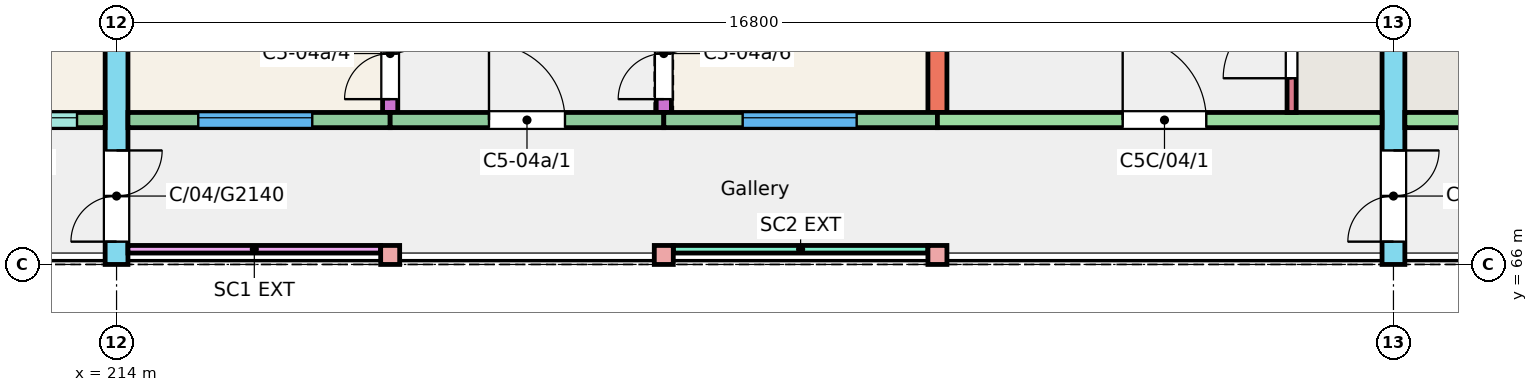
"""IFC4 building model, lengths in metres.
Left out: names, types, materials, properties, quantities, classifications, styles, units other than length and angle.
Written with IfcOpenShell. Run it as: python <this file> out.ifc"""

import sys

from ifc_helpers import new_model, si_unit, direction, frame, frame_2d, origin, origin_2d, place, context, subcontext, project, spatial, rectangle, extrude, element, fill, save


model = new_model("IFC4")
c1 = context("Model", 3, precision=1e-05, world=origin(), true_north=direction((0.0, 1.0)))
c2 = subcontext(c1, "Body", "Model", "MODEL_VIEW")
j1 = project(units=[si_unit("LENGTHUNIT", "METRE"), si_unit("PLANEANGLEUNIT", "RADIAN")], contexts=[c1])
p1 = place(None, origin())
s1 = spatial("IfcSite", under=j1, at=p1, CompositionType="ELEMENT")
p2 = place(p1, origin())
s2 = spatial("IfcBuilding", under=s1, at=p2, CompositionType="ELEMENT")
p3 = place(p2, frame((0.0, 0.0, 12.0)))
s3 = spatial("IfcBuildingStorey", under=s2, at=p3, CompositionType="ELEMENT", Elevation=12.0)
p4 = place(p3, frame((214.0, 66.0, 0.0), z_axis=(0.0, 0.0, 1.0), x_axis=(0.0, 1.0, 0.0)))
e1 = element("IfcWall", 1, at=p4, inside=s3, PredefinedType="SHEAR", context=c2, shape_type="SweptSolid", body=[
    extrude(rectangle(XDim=11.0, YDim=0.3, at=frame_2d((5.5, 0.0))), origin(), (0.0, 0.0, 1.0), 3.0),
])
p5 = place(p4, frame((0.3, 0.0, 0.0)))
e2 = element("IfcOpeningElement", 2, at=p5, cuts=e1, PredefinedType="OPENING", context=c2, shape_type="SweptSolid", body=[
    extrude(rectangle(XDim=1.2, YDim=2.1, at=frame_2d((0.6, 1.05))), frame((0.0, 0.16, 0.0), z_axis=(0.0, -1.0, 0.0), x_axis=(1.0, 0.0, 0.0)), (0.0, 0.0, 1.0), 0.32),
])
p6 = place(p3, frame((217.6, 68.0, 0.0), z_axis=(0.0, 0.0, 1.0), x_axis=(0.0, 1.0, 0.0)))
e3 = element("IfcWall", 3, at=p6, inside=s3, PredefinedType="SHEAR", context=c2, shape_type="SweptSolid", body=[
    extrude(rectangle(XDim=9.0, YDim=0.2, at=frame_2d((4.5, 0.0))), origin(), (0.0, 0.0, 1.0), 3.0),
])
p7 = place(p6, frame((0.175, 0.0, 0.0)))
e4 = element("IfcOpeningElement", 4, at=p7, cuts=e3, PredefinedType="OPENING", context=c2, shape_type="SweptSolid", body=[
    extrude(rectangle(XDim=1.2, YDim=2.1, at=frame_2d((0.6, 1.05))), frame((0.0, 0.11, 0.0), z_axis=(0.0, -1.0, 0.0), x_axis=(1.0, 0.0, 0.0)), (0.0, 0.0, 1.0), 0.22),
])
p8 = place(p6, frame((6.4, 0.0, 0.0)))
e5 = element("IfcOpeningElement", 5, at=p8, cuts=e3, PredefinedType="OPENING", context=c2, shape_type="SweptSolid", body=[
    extrude(rectangle(XDim=1.2, YDim=2.1, at=frame_2d((0.6, 1.05))), frame((0.0, 0.11, 0.0), z_axis=(0.0, -1.0, 0.0), x_axis=(1.0, 0.0, 0.0)), (0.0, 0.0, 1.0), 0.22),
])
p9 = place(p3, frame((221.2, 68.0, 0.0), z_axis=(0.0, 0.0, 1.0), x_axis=(0.0, 1.0, 0.0)))
e6 = element("IfcWall", 6, at=p9, inside=s3, PredefinedType="SHEAR", context=c2, shape_type="SweptSolid", body=[
    extrude(rectangle(XDim=9.0, YDim=0.2, at=frame_2d((4.5, 0.0))), origin(), (0.0, 0.0, 1.0), 3.0),
])
p10 = place(p9, frame((0.175, 0.0, 0.0)))
e7 = element("IfcOpeningElement", 7, at=p10, cuts=e6, PredefinedType="OPENING", context=c2, shape_type="SweptSolid", body=[
    extrude(rectangle(XDim=1.2, YDim=2.1, at=frame_2d((0.6, 1.05))), frame((0.0, 0.11, 0.0), z_axis=(0.0, -1.0, 0.0), x_axis=(1.0, 0.0, 0.0)), (0.0, 0.0, 1.0), 0.22),
])
p11 = place(p9, frame((6.4, 0.0, 0.0)))
e8 = element("IfcOpeningElement", 8, at=p11, cuts=e6, PredefinedType="OPENING", context=c2, shape_type="SweptSolid", body=[
    extrude(rectangle(XDim=1.2, YDim=2.1, at=frame_2d((0.6, 1.05))), frame((0.0, 0.11, 0.0), z_axis=(0.0, -1.0, 0.0), x_axis=(1.0, 0.0, 0.0)), (0.0, 0.0, 1.0), 0.22),
])
p12 = place(p3, frame((224.8, 68.0, 0.0), z_axis=(0.0, 0.0, 1.0), x_axis=(0.0, 1.0, 0.0)))
e9 = element("IfcWall", 9, at=p12, inside=s3, PredefinedType="SHEAR", context=c2, shape_type="SweptSolid", body=[
    extrude(rectangle(XDim=9.0, YDim=0.25, at=frame_2d((4.5, 0.0))), origin(), (0.0, 0.0, 1.0), 3.0),
])
p13 = place(p3, frame((230.8, 66.0, 0.0), z_axis=(0.0, 0.0, 1.0), x_axis=(0.0, 1.0, 0.0)))
e10 = element("IfcWall", 10, at=p13, inside=s3, PredefinedType="SHEAR", context=c2, shape_type="SweptSolid", body=[
    extrude(rectangle(XDim=11.0, YDim=0.3, at=frame_2d((5.5, 0.0))), origin(), (0.0, 0.0, 1.0), 3.0),
])
p14 = place(p13, frame((0.3, 0.0, 0.0)))
e11 = element("IfcOpeningElement", 11, at=p14, cuts=e10, PredefinedType="OPENING", context=c2, shape_type="SweptSolid", body=[
    extrude(rectangle(XDim=1.2, YDim=2.1, at=frame_2d((0.6, 1.05))), frame((0.0, 0.16, 0.0), z_axis=(0.0, -1.0, 0.0), x_axis=(1.0, 0.0, 0.0)), (0.0, 0.0, 1.0), 0.32),
])
p15 = place(p3, frame((210.4, 67.9, 0.0), z_axis=(0.0, 0.0, 1.0), x_axis=(1.0, 0.0, 0.0)))
e12 = element("IfcWall", 12, at=p15, inside=s3, PredefinedType="SOLIDWALL", context=c2, shape_type="SweptSolid", body=[
    extrude(rectangle(XDim=3.45, YDim=0.2, at=frame_2d((1.725, 0.0))), origin(), (0.0, 0.0, 1.0), 3.0),
])
p16 = place(p15, frame((1.88, 0.0, 1.1)))
e13 = element("IfcOpeningElement", 13, at=p16, cuts=e12, PredefinedType="OPENING", context=c2, shape_type="SweptSolid", body=[
    extrude(rectangle(XDim=1.2, YDim=1.3, at=frame_2d((0.6, 0.65))), frame((0.0, 0.11, 0.0), z_axis=(0.0, -1.0, 0.0), x_axis=(1.0, 0.0, 0.0)), (0.0, 0.0, 1.0), 0.22),
])
p17 = place(p15, frame((0.25, 0.0, 0.0)))
e14 = element("IfcOpeningElement", 14, at=p17, cuts=e12, PredefinedType="OPENING", context=c2, shape_type="SweptSolid", body=[
    extrude(rectangle(XDim=1.0, YDim=2.1, at=frame_2d((0.5, 1.05))), frame((0.0, 0.11, 0.0), z_axis=(0.0, -1.0, 0.0), x_axis=(1.0, 0.0, 0.0)), (0.0, 0.0, 1.0), 0.22),
])
p18 = place(p3, frame((214.15, 67.9, 0.0), z_axis=(0.0, 0.0, 1.0), x_axis=(1.0, 0.0, 0.0)))
e15 = element("IfcWall", 15, at=p18, inside=s3, PredefinedType="SOLIDWALL", context=c2, shape_type="SweptSolid", body=[
    extrude(rectangle(XDim=3.45, YDim=0.2, at=frame_2d((1.725, 0.0))), origin(), (0.0, 0.0, 1.0), 3.0),
])
p19 = place(p18, frame((0.925, 0.0, 0.9)))
e16 = element("IfcOpeningElement", 16, at=p19, cuts=e15, PredefinedType="OPENING", context=c2, shape_type="SweptSolid", body=[
    extrude(rectangle(XDim=1.5, YDim=1.5, at=frame_2d((0.75, 0.75))), frame((0.0, 0.11, 0.0), z_axis=(0.0, -1.0, 0.0), x_axis=(1.0, 0.0, 0.0)), (0.0, 0.0, 1.0), 0.22),
])
p20 = place(p3, frame((217.6, 67.9, 0.0), z_axis=(0.0, 0.0, 1.0), x_axis=(1.0, 0.0, 0.0)))
e17 = element("IfcWall", 17, at=p20, inside=s3, PredefinedType="SOLIDWALL", context=c2, shape_type="SweptSolid", body=[
    extrude(rectangle(XDim=3.6, YDim=0.2, at=frame_2d((1.8, 0.0))), origin(), (0.0, 0.0, 1.0), 3.0),
])
p21 = place(p20, frame((1.3, 0.0, 0.0)))
e18 = element("IfcOpeningElement", 18, at=p21, cuts=e17, PredefinedType="OPENING", context=c2, shape_type="SweptSolid", body=[
    extrude(rectangle(XDim=1.0, YDim=2.1, at=frame_2d((0.5, 1.05))), frame((0.0, 0.11, 0.0), z_axis=(0.0, -1.0, 0.0), x_axis=(1.0, 0.0, 0.0)), (0.0, 0.0, 1.0), 0.22),
])
p22 = place(p3, frame((221.2, 67.9, 0.0), z_axis=(0.0, 0.0, 1.0), x_axis=(1.0, 0.0, 0.0)))
e19 = element("IfcWall", 19, at=p22, inside=s3, PredefinedType="SOLIDWALL", context=c2, shape_type="SweptSolid", body=[
    extrude(rectangle(XDim=3.6, YDim=0.2, at=frame_2d((1.8, 0.0))), origin(), (0.0, 0.0, 1.0), 3.0),
])
p23 = place(p22, frame((1.038, 0.0, 0.9)))
e20 = element("IfcOpeningElement", 20, at=p23, cuts=e19, PredefinedType="OPENING", context=c2, shape_type="SweptSolid", body=[
    extrude(rectangle(XDim=1.5, YDim=1.5, at=frame_2d((0.75, 0.75))), frame((0.0, 0.11, 0.0), z_axis=(0.0, -1.0, 0.0), x_axis=(1.0, 0.0, 0.0)), (0.0, 0.0, 1.0), 0.22),
])
p24 = place(p3, frame((224.8, 67.9, 0.0), z_axis=(0.0, 0.0, 1.0), x_axis=(1.0, 0.0, 0.0)))
e21 = element("IfcWall", 21, at=p24, inside=s3, PredefinedType="SHEAR", context=c2, shape_type="SweptSolid", body=[
    extrude(rectangle(XDim=5.85, YDim=0.2, at=frame_2d((2.925, 0.0))), origin(), (0.0, 0.0, 1.0), 3.0),
])
p25 = place(p24, frame((2.438, 0.0, 0.0)))
e22 = element("IfcOpeningElement", 22, at=p25, cuts=e21, PredefinedType="OPENING", context=c2, shape_type="SweptSolid", body=[
    extrude(rectangle(XDim=1.1, YDim=2.1, at=frame_2d((0.55, 1.05))), frame((0.0, 0.11, 0.0), z_axis=(0.0, -1.0, 0.0), x_axis=(1.0, 0.0, 0.0)), (0.0, 0.0, 1.0), 0.22),
])
p26 = place(p3, frame((229.46, 68.0, 0.0), z_axis=(0.0, 0.0, 1.0), x_axis=(0.0, 1.0, 0.0)))
e23 = element("IfcWall", 23, at=p26, inside=s3, PredefinedType="SHEAR", context=c2, shape_type="SweptSolid", body=[
    extrude(rectangle(XDim=1.72, YDim=0.12, at=frame_2d((0.86, 0.0))), origin(), (0.0, 0.0, 1.0), 3.0),
])
p27 = place(p26, frame((0.45, 0.0, 0.0)))
e24 = element("IfcOpeningElement", 24, at=p27, cuts=e23, PredefinedType="OPENING", context=c2, shape_type="SweptSolid", body=[
    extrude(rectangle(XDim=0.9, YDim=2.1, at=frame_2d((0.45, 1.05))), frame((0.0, 0.07, 0.0), z_axis=(0.0, -1.0, 0.0), x_axis=(1.0, 0.0, 0.0)), (0.0, 0.0, 1.0), 0.14),
])
p28 = place(p3, frame((230.95, 67.9, 0.0), z_axis=(0.0, 0.0, 1.0), x_axis=(1.0, 0.0, 0.0)))
e25 = element("IfcWall", 25, at=p28, inside=s3, PredefinedType="SHEAR", context=c2, shape_type="SweptSolid", body=[
    extrude(rectangle(XDim=5.85, YDim=0.2, at=frame_2d((2.925, 0.0))), origin(), (0.0, 0.0, 1.0), 3.0),
])
p29 = place(p28, frame((2.312, 0.0, 0.0)))
e26 = element("IfcOpeningElement", 26, at=p29, cuts=e25, PredefinedType="OPENING", context=c2, shape_type="SweptSolid", body=[
    extrude(rectangle(XDim=1.1, YDim=2.1, at=frame_2d((0.55, 1.05))), frame((0.0, 0.11, 0.0), z_axis=(0.0, -1.0, 0.0), x_axis=(1.0, 0.0, 0.0)), (0.0, 0.0, 1.0), 0.22),
])
for number, where, z_axis, x_axis in (
    (27, (217.6, 66.125, 0.0), (0.0, 0.0, 1.0), (1.0, 0.0, 0.0)),
    (28, (221.2, 66.125, 0.0), (0.0, 0.0, 1.0), (1.0, 0.0, 0.0)),
    (29, (224.8, 66.125, 0.0), (0.0, 0.0, 1.0), (1.0, 0.0, 0.0)),
):
    element("IfcColumn", number, at=place(p3, frame(where, z_axis=z_axis, x_axis=x_axis)), inside=s3, PredefinedType="COLUMN", context=c2, shape_type="SweptSolid", body=[
        extrude(rectangle(XDim=0.25, YDim=0.25, at=origin_2d()), origin(), (0.0, 0.0, 1.0), 3.0),
    ])
p30 = place(p3, frame((214.15, 66.2, 0.0), z_axis=(0.0, 0.0, 1.0), x_axis=(1.0, 0.0, 0.0)))
e30 = element("IfcWall", 30, at=p30, inside=s3, PredefinedType="SOLIDWALL", context=c2, shape_type="SweptSolid", body=[
    extrude(rectangle(XDim=3.325, YDim=0.1, at=frame_2d((1.663, 0.0))), origin(), (0.0, 0.0, 1.0), 2.45),
])
p31 = place(p3, frame((221.325, 66.2, 0.0), z_axis=(0.0, 0.0, 1.0), x_axis=(1.0, 0.0, 0.0)))
e31 = element("IfcWall", 31, at=p31, inside=s3, PredefinedType="SOLIDWALL", context=c2, shape_type="SweptSolid", body=[
    extrude(rectangle(XDim=3.35, YDim=0.1, at=frame_2d((1.675, 0.0))), origin(), (0.0, 0.0, 1.0), 2.45),
])
p32 = place(p16, origin())
e32 = element("IfcWindow", 32, at=p32, inside=s3, PartitioningType="SINGLE_PANEL", PredefinedType="WINDOW", context=c2, shape_type="SweptSolid", body=[
    extrude(rectangle(XDim=1.2, YDim=1.3, at=frame_2d((0.6, 0.65))), frame((0.0, 0.06, 0.0), z_axis=(0.0, -1.0, 0.0), x_axis=(1.0, 0.0, 0.0)), (0.0, 0.0, 1.0), 0.06),
])
fill(e13, e32)
p33 = place(p19, origin())
e33 = element("IfcWindow", 33, at=p33, inside=s3, PartitioningType="SINGLE_PANEL", PredefinedType="WINDOW", context=c2, shape_type="SweptSolid", body=[
    extrude(rectangle(XDim=1.5, YDim=1.5, at=frame_2d((0.75, 0.75))), frame((0.0, 0.06, 0.0), z_axis=(0.0, -1.0, 0.0), x_axis=(1.0, 0.0, 0.0)), (0.0, 0.0, 1.0), 0.06),
])
fill(e16, e33)
p34 = place(p23, origin())
e34 = element("IfcWindow", 34, at=p34, inside=s3, PartitioningType="SINGLE_PANEL", PredefinedType="WINDOW", context=c2, shape_type="SweptSolid", body=[
    extrude(rectangle(XDim=1.5, YDim=1.5, at=frame_2d((0.75, 0.75))), frame((0.0, 0.06, 0.0), z_axis=(0.0, -1.0, 0.0), x_axis=(1.0, 0.0, 0.0)), (0.0, 0.0, 1.0), 0.06),
])
fill(e20, e34)
p35 = place(p21, origin())
e35 = element("IfcDoor", 35, at=p35, inside=s3, OperationType="SINGLE_SWING_LEFT", PredefinedType="DOOR", context=c2, shape_type="SweptSolid", body=[
    extrude(rectangle(XDim=1.0, YDim=2.1, at=frame_2d((0.5, 1.05))), frame((0.0, 0.025, 0.0), z_axis=(0.0, -1.0, 0.0), x_axis=(1.0, 0.0, 0.0)), (0.0, 0.0, 1.0), 0.05),
])
fill(e18, e35)
p36 = place(p7, origin())
e36 = element("IfcDoor", 36, at=p36, inside=s3, OperationType="DOUBLE_DOOR_SINGLE_SWING", PredefinedType="DOOR", context=c2, shape_type="SweptSolid", body=[
    extrude(rectangle(XDim=1.2, YDim=2.1, at=frame_2d((0.6, 1.05))), frame((0.0, 0.025, 0.0), z_axis=(0.0, -1.0, 0.0), x_axis=(1.0, 0.0, 0.0)), (0.0, 0.0, 1.0), 0.05),
])
fill(e4, e36)
p37 = place(p10, origin())
e37 = element("IfcDoor", 37, at=p37, inside=s3, OperationType="DOUBLE_DOOR_SINGLE_SWING", PredefinedType="DOOR", context=c2, shape_type="SweptSolid", body=[
    extrude(rectangle(XDim=1.2, YDim=2.1, at=frame_2d((0.6, 1.05))), frame((0.0, 0.025, 0.0), z_axis=(0.0, -1.0, 0.0), x_axis=(1.0, 0.0, 0.0)), (0.0, 0.0, 1.0), 0.05),
])
fill(e7, e37)
p38 = place(p25, origin())
e38 = element("IfcDoor", 38, at=p38, inside=s3, OperationType="SINGLE_SWING_LEFT", PredefinedType="DOOR", context=c2, shape_type="SweptSolid", body=[
    extrude(rectangle(XDim=1.1, YDim=2.1, at=frame_2d((0.55, 1.05))), frame((0.0, 0.025, 0.0), z_axis=(0.0, -1.0, 0.0), x_axis=(1.0, 0.0, 0.0)), (0.0, 0.0, 1.0), 0.05),
])
fill(e22, e38)
p39 = place(p27, origin())
e39 = element("IfcDoor", 39, at=p39, inside=s3, OperationType="SINGLE_SWING_LEFT", PredefinedType="DOOR", context=c2, shape_type="SweptSolid", body=[
    extrude(rectangle(XDim=0.9, YDim=2.1, at=frame_2d((0.45, 1.05))), frame((0.0, 0.025, 0.0), z_axis=(0.0, -1.0, 0.0), x_axis=(1.0, 0.0, 0.0)), (0.0, 0.0, 1.0), 0.05),
])
fill(e24, e39)
p40 = place(p5, origin())
e40 = element("IfcDoor", 40, at=p40, inside=s3, OperationType="DOUBLE_DOOR_SINGLE_SWING", PredefinedType="DOOR", context=c2, shape_type="SweptSolid", body=[
    extrude(rectangle(XDim=1.2, YDim=2.1, at=frame_2d((0.6, 1.05))), frame((0.0, 0.025, 0.0), z_axis=(0.0, -1.0, 0.0), x_axis=(1.0, 0.0, 0.0)), (0.0, 0.0, 1.0), 0.05),
])
fill(e2, e40)
p41 = place(p14, origin())
e41 = element("IfcDoor", 41, at=p41, inside=s3, OperationType="DOUBLE_DOOR_SINGLE_SWING", PredefinedType="DOOR", context=c2, shape_type="SweptSolid", body=[
    extrude(rectangle(XDim=1.2, YDim=2.1, at=frame_2d((0.6, 1.05))), frame((0.0, 0.025, 0.0), z_axis=(0.0, -1.0, 0.0), x_axis=(1.0, 0.0, 0.0)), (0.0, 0.0, 1.0), 0.05),
])
fill(e11, e41)
save(model, sys.argv[1])
